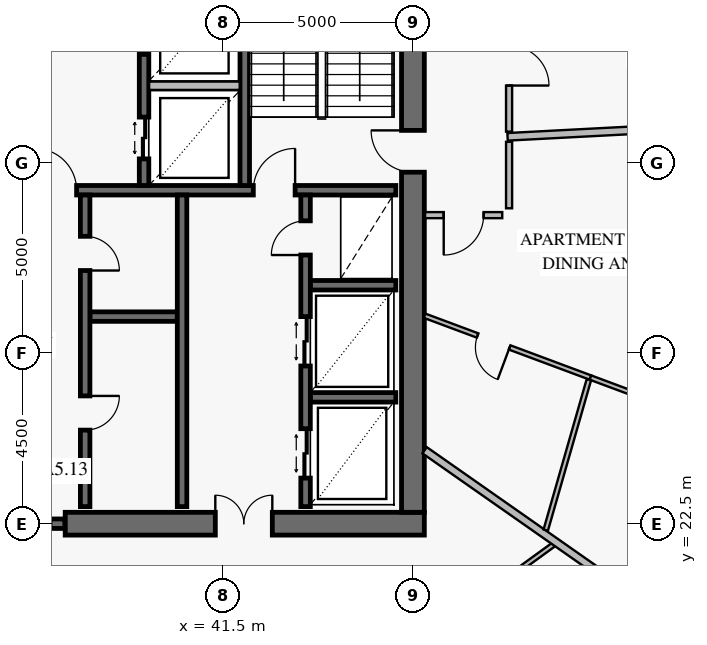
"""IFC4 building model, lengths in metres.
Left out: names, types, materials, properties, quantities, classifications, styles, units other than length and angle.
Written with IfcOpenShell. Run it as: python <this file> out.ifc"""

import sys

from ifc_helpers import new_model, si_unit, direction, frame, frame_2d, origin, place, context, subcontext, project, spatial, rectangle, extrude, element, fill, save


model = new_model("IFC4")
c1 = context("Model", 3, precision=1e-05, world=origin(), true_north=direction((0.0, 1.0)))
c2 = subcontext(c1, "Body", "Model", "MODEL_VIEW")
j1 = project(units=[si_unit("LENGTHUNIT", "METRE"), si_unit("PLANEANGLEUNIT", "RADIAN")], contexts=[c1])
p1 = place(None, origin())
s1 = spatial("IfcSite", under=j1, at=p1, CompositionType="ELEMENT")
p2 = place(p1, origin())
s2 = spatial("IfcBuilding", under=s1, at=p2, CompositionType="ELEMENT")
p3 = place(p2, frame((0.0, 0.0, 254.0)))
s3 = spatial("IfcBuildingStorey", under=s2, at=p3, CompositionType="ELEMENT", Elevation=254.0)
p4 = place(p3, frame((37.35, 22.5, 0.0), z_axis=(0.0, 0.0, 1.0), x_axis=(1.0, 0.0, 0.0)))
e1 = element("IfcWall", 1, at=p4, inside=s3, PredefinedType="SHEAR", context=c2, shape_type="SweptSolid", body=[
    extrude(rectangle(XDim=9.45, YDim=0.6, at=frame_2d((4.725, 0.0))), origin(), (0.0, 0.0, 1.0), 3.8),
])
p5 = place(p4, frame((3.95, 0.0, 0.0)))
e2 = element("IfcOpeningElement", 2, at=p5, cuts=e1, PredefinedType="OPENING", context=c2, shape_type="SweptSolid", body=[
    extrude(rectangle(XDim=1.5, YDim=2.15, at=frame_2d((0.75, 1.075))), frame((0.0, 0.312, 0.0), z_axis=(0.0, -1.0, 0.0), x_axis=(1.0, 0.0, 0.0)), (0.0, 0.0, 1.0), 0.624),
])
p6 = place(p3, frame((46.5, 22.8, 0.0), z_axis=(0.0, 0.0, 1.0), x_axis=(0.0, 1.0, 0.0)))
e3 = element("IfcWall", 3, at=p6, inside=s3, PredefinedType="SHEAR", context=c2, shape_type="SweptSolid", body=[
    extrude(rectangle(XDim=18.4, YDim=0.6, at=frame_2d((9.2, 0.0))), origin(), (0.0, 0.0, 1.0), 3.8),
])
p7 = place(p6, frame((8.95, 0.0, 0.0)))
e4 = element("IfcOpeningElement", 4, at=p7, cuts=e3, PredefinedType="OPENING", context=c2, shape_type="SweptSolid", body=[
    extrude(rectangle(XDim=1.1, YDim=2.15, at=frame_2d((0.55, 1.075))), frame((0.0, 0.312, 0.0), z_axis=(0.0, -1.0, 0.0), x_axis=(1.0, 0.0, 0.0)), (0.0, 0.0, 1.0), 0.624),
])
p8 = place(p3, frame((35.06, 22.5, 0.0), z_axis=(0.0, 0.0, 1.0), x_axis=(1.0, 0.0, 0.0)))
e5 = element("IfcWall", 5, at=p8, inside=s3, PredefinedType="SOLIDWALL", context=c2, shape_type="SweptSolid", body=[
    extrude(rectangle(XDim=2.28, YDim=0.25, at=frame_2d((1.14, 0.0))), origin(), (0.0, 0.0, 1.0), 3.8),
])
p9 = place(p8, frame((0.39, 0.0, 0.0)))
e6 = element("IfcOpeningElement", 6, at=p9, cuts=e5, PredefinedType="OPENING", context=c2, shape_type="SweptSolid", body=[
    extrude(rectangle(XDim=1.5, YDim=2.15, at=frame_2d((0.75, 1.075))), frame((0.0, 0.137, 0.0), z_axis=(0.0, -1.0, 0.0), x_axis=(1.0, 0.0, 0.0)), (0.0, 0.0, 1.0), 0.274),
])
p10 = place(p3, frame((25.95, 31.275, 0.0), z_axis=(0.0, 0.0, 1.0), x_axis=(1.0, 0.0, 0.0)))
e7 = element("IfcWall", 7, at=p10, inside=s3, PredefinedType="SOLIDWALL", context=c2, shape_type="SweptSolid", body=[
    extrude(rectangle(XDim=20.1, YDim=0.25, at=frame_2d((10.05, 0.0))), origin(), (0.0, 0.0, 1.0), 3.8),
])
p11 = place(p10, frame((2.6, 0.0, 0.0)))
e8 = element("IfcOpeningElement", 8, at=p11, cuts=e7, PredefinedType="OPENING", context=c2, shape_type="SweptSolid", body=[
    extrude(rectangle(XDim=1.1, YDim=2.15, at=frame_2d((0.55, 1.075))), frame((0.0, 0.137, 0.0), z_axis=(0.0, -1.0, 0.0), x_axis=(1.0, 0.0, 0.0)), (0.0, 0.0, 1.0), 0.274),
])
p12 = place(p10, frame((10.6, 0.0, 0.0)))
e9 = element("IfcOpeningElement", 9, at=p12, cuts=e7, PredefinedType="OPENING", context=c2, shape_type="SweptSolid", body=[
    extrude(rectangle(XDim=1.1, YDim=2.15, at=frame_2d((0.55, 1.075))), frame((0.0, 0.137, 0.0), z_axis=(0.0, -1.0, 0.0), x_axis=(1.0, 0.0, 0.0)), (0.0, 0.0, 1.0), 0.274),
])
p13 = place(p10, frame((16.35, 0.0, 0.0)))
e10 = element("IfcOpeningElement", 10, at=p13, cuts=e7, PredefinedType="OPENING", context=c2, shape_type="SweptSolid", body=[
    extrude(rectangle(XDim=1.1, YDim=2.15, at=frame_2d((0.55, 1.075))), frame((0.0, 0.137, 0.0), z_axis=(0.0, -1.0, 0.0), x_axis=(1.0, 0.0, 0.0)), (0.0, 0.0, 1.0), 0.274),
])
p14 = place(p3, frame((42.075, 31.4, 0.0), z_axis=(0.0, 0.0, 1.0), x_axis=(0.0, 1.0, 0.0)))
e11 = element("IfcWall", 11, at=p14, inside=s3, PredefinedType="SOLIDWALL", context=c2, shape_type="SweptSolid", body=[
    extrude(rectangle(XDim=9.7, YDim=0.25, at=frame_2d((4.85, 0.0))), origin(), (0.0, 0.0, 1.0), 3.8),
])
p15 = place(p3, frame((39.425, 31.4, 0.0), z_axis=(0.0, 0.0, 1.0), x_axis=(0.0, 1.0, 0.0)))
e12 = element("IfcWall", 12, at=p15, inside=s3, PredefinedType="SOLIDWALL", context=c2, shape_type="SweptSolid", body=[
    extrude(rectangle(XDim=9.65, YDim=0.25, at=frame_2d((4.825, 0.0))), origin(), (0.0, 0.0, 1.0), 3.8),
])
p16 = place(p15, frame((0.7, 0.0, 0.0)))
e13 = element("IfcOpeningElement", 13, at=p16, cuts=e12, PredefinedType="OPENING", context=c2, shape_type="SweptSolid", body=[
    extrude(rectangle(XDim=1.1, YDim=2.2, at=frame_2d((0.55, 1.1))), frame((0.0, 0.137, 0.0), z_axis=(0.0, -1.0, 0.0), x_axis=(1.0, 0.0, 0.0)), (0.0, 0.0, 1.0), 0.274),
])
p17 = place(p15, frame((3.45, 0.0, 0.0)))
e14 = element("IfcOpeningElement", 14, at=p17, cuts=e12, PredefinedType="OPENING", context=c2, shape_type="SweptSolid", body=[
    extrude(rectangle(XDim=1.1, YDim=2.2, at=frame_2d((0.55, 1.1))), frame((0.0, 0.137, 0.0), z_axis=(0.0, -1.0, 0.0), x_axis=(1.0, 0.0, 0.0)), (0.0, 0.0, 1.0), 0.274),
])
p18 = place(p15, frame((6.2, 0.0, 0.0)))
e15 = element("IfcOpeningElement", 15, at=p18, cuts=e12, PredefinedType="OPENING", context=c2, shape_type="SweptSolid", body=[
    extrude(rectangle(XDim=1.1, YDim=2.2, at=frame_2d((0.55, 1.1))), frame((0.0, 0.137, 0.0), z_axis=(0.0, -1.0, 0.0), x_axis=(1.0, 0.0, 0.0)), (0.0, 0.0, 1.0), 0.274),
])
p19 = place(p15, frame((8.47, 0.0, 0.0)))
e16 = element("IfcOpeningElement", 16, at=p19, cuts=e12, PredefinedType="OPENING", context=c2, shape_type="SweptSolid", body=[
    extrude(rectangle(XDim=0.9, YDim=2.1, at=frame_2d((0.45, 1.05))), frame((0.0, 0.137, 0.0), z_axis=(0.0, -1.0, 0.0), x_axis=(1.0, 0.0, 0.0)), (0.0, 0.0, 1.0), 0.274),
])
p20 = place(p3, frame((38.0, 27.95, 0.0), z_axis=(0.0, 0.0, 1.0), x_axis=(1.0, 0.0, 0.0)))
e17 = element("IfcWall", 17, at=p20, inside=s3, PredefinedType="SOLIDWALL", context=c2, shape_type="SweptSolid", body=[
    extrude(rectangle(XDim=2.3, YDim=0.25, at=frame_2d((1.15, 0.0))), origin(), (0.0, 0.0, 1.0), 3.8),
])
p21 = place(p3, frame((37.875, 22.95, 0.0), z_axis=(0.0, 0.0, 1.0), x_axis=(0.0, 1.0, 0.0)))
e18 = element("IfcWall", 18, at=p21, inside=s3, PredefinedType="SOLIDWALL", context=c2, shape_type="SweptSolid", body=[
    extrude(rectangle(XDim=8.2, YDim=0.25, at=frame_2d((4.1, 0.0))), origin(), (0.0, 0.0, 1.0), 3.8),
])
p22 = place(p21, frame((2.012, 0.0, 0.0)))
e19 = element("IfcOpeningElement", 19, at=p22, cuts=e18, PredefinedType="OPENING", context=c2, shape_type="SweptSolid", body=[
    extrude(rectangle(XDim=0.9, YDim=2.1, at=frame_2d((0.45, 1.05))), frame((0.0, 0.137, 0.0), z_axis=(0.0, -1.0, 0.0), x_axis=(1.0, 0.0, 0.0)), (0.0, 0.0, 1.0), 0.274),
])
p23 = place(p21, frame((6.212, 0.0, 0.0)))
e20 = element("IfcOpeningElement", 20, at=p23, cuts=e18, PredefinedType="OPENING", context=c2, shape_type="SweptSolid", body=[
    extrude(rectangle(XDim=0.9, YDim=2.1, at=frame_2d((0.45, 1.05))), frame((0.0, 0.137, 0.0), z_axis=(0.0, -1.0, 0.0), x_axis=(1.0, 0.0, 0.0)), (0.0, 0.0, 1.0), 0.274),
])
p24 = place(p3, frame((40.425, 22.95, 0.0), z_axis=(0.0, 0.0, 1.0), x_axis=(0.0, 1.0, 0.0)))
e21 = element("IfcWall", 21, at=p24, inside=s3, PredefinedType="SOLIDWALL", context=c2, shape_type="SweptSolid", body=[
    extrude(rectangle(XDim=8.2, YDim=0.25, at=frame_2d((4.1, 0.0))), origin(), (0.0, 0.0, 1.0), 3.8),
])
for number, where, z_axis, x_axis in (
    (22, (43.8, 25.825, 0.0), (0.0, 0.0, 1.0), (1.0, 0.0, 0.0)),
    (23, (43.8, 28.775, 0.0), (0.0, 0.0, 1.0), (1.0, 0.0, 0.0)),
):
    element("IfcWall", number, at=place(p3, frame(where, z_axis=z_axis, x_axis=x_axis)), inside=s3, PredefinedType="SOLIDWALL", context=c2, shape_type="SweptSolid", body=[
        extrude(rectangle(XDim=2.25, YDim=0.25, at=frame_2d((1.125, 0.0))), origin(), (0.0, 0.0, 1.0), 3.8),
    ])
p25 = place(p3, frame((43.675, 22.95, 0.0), z_axis=(0.0, 0.0, 1.0), x_axis=(0.0, 1.0, 0.0)))
e24 = element("IfcWall", 24, at=p25, inside=s3, PredefinedType="SOLIDWALL", context=c2, shape_type="SweptSolid", body=[
    extrude(rectangle(XDim=8.2, YDim=0.25, at=frame_2d((4.1, 0.0))), origin(), (0.0, 0.0, 1.0), 3.8),
])
p26 = place(p25, frame((0.75, 0.0, 0.0)))
e25 = element("IfcOpeningElement", 25, at=p26, cuts=e24, PredefinedType="OPENING", context=c2, shape_type="SweptSolid", body=[
    extrude(rectangle(XDim=1.3, YDim=2.3, at=frame_2d((0.65, 1.15))), frame((0.0, 0.137, 0.0), z_axis=(0.0, -1.0, 0.0), x_axis=(1.0, 0.0, 0.0)), (0.0, 0.0, 1.0), 0.274),
])
p27 = place(p25, frame((3.7, 0.0, 0.0)))
e26 = element("IfcOpeningElement", 26, at=p27, cuts=e24, PredefinedType="OPENING", context=c2, shape_type="SweptSolid", body=[
    extrude(rectangle(XDim=1.3, YDim=2.3, at=frame_2d((0.65, 1.15))), frame((0.0, 0.137, 0.0), z_axis=(0.0, -1.0, 0.0), x_axis=(1.0, 0.0, 0.0)), (0.0, 0.0, 1.0), 0.274),
])
p28 = place(p25, frame((6.62, 0.0, 0.0)))
e27 = element("IfcOpeningElement", 27, at=p28, cuts=e24, PredefinedType="OPENING", context=c2, shape_type="SweptSolid", body=[
    extrude(rectangle(XDim=0.9, YDim=2.1, at=frame_2d((0.45, 1.05))), frame((0.0, 0.137, 0.0), z_axis=(0.0, -1.0, 0.0), x_axis=(1.0, 0.0, 0.0)), (0.0, 0.0, 1.0), 0.274),
])
p29 = place(p3, frame((46.808, 27.972, 0.0), z_axis=(0.0, 0.0, 1.0), x_axis=(0.937036038674, -0.349232676344, 0.0)))
e28 = element("IfcWall", 28, at=p29, inside=s3, PredefinedType="PARTITIONING", context=c2, shape_type="SweptSolid", body=[
    extrude(rectangle(XDim=4.657, YDim=0.12, at=frame_2d((2.329, 0.0))), origin(), (0.0, 0.0, 1.0), 3.55),
])
p30 = place(p29, frame((1.487, 0.0, 0.0)))
e29 = element("IfcOpeningElement", 29, at=p30, cuts=e28, PredefinedType="OPENING", context=c2, shape_type="SweptSolid", body=[
    extrude(rectangle(XDim=0.9, YDim=2.1, at=frame_2d((0.45, 1.05))), frame((0.0, 0.072, 0.0), z_axis=(0.0, -1.0, 0.0), x_axis=(1.0, 0.0, 0.0)), (0.0, 0.0, 1.0), 0.144),
])
p31 = place(p3, frame((51.172, 26.345, 0.0), z_axis=(0.0, 0.0, 1.0), x_axis=(0.937041629646, -0.349217674682, 0.0)))
e30 = element("IfcWall", 30, at=p31, inside=s3, PredefinedType="PARTITIONING", context=c2, shape_type="SweptSolid", body=[
    extrude(rectangle(XDim=4.101, YDim=0.12, at=frame_2d((2.051, 0.0))), origin(), (0.0, 0.0, 1.0), 3.15),
])
p32 = place(p31, frame((2.359, 0.0, 0.0)))
e31 = element("IfcOpeningElement", 31, at=p32, cuts=e30, PredefinedType="OPENING", context=c2, shape_type="SweptSolid", body=[
    extrude(rectangle(XDim=0.95, YDim=2.1, at=frame_2d((0.475, 1.05))), frame((0.0, 0.072, 0.0), z_axis=(0.0, -1.0, 0.0), x_axis=(1.0, 0.0, 0.0)), (0.0, 0.0, 1.0), 0.144),
])
p33 = place(p3, frame((46.82, 30.62, 0.0), z_axis=(0.0, 0.0, 1.0), x_axis=(1.0, 0.0, 0.0)))
e32 = element("IfcWall", 32, at=p33, inside=s3, PredefinedType="PARTITIONING", context=c2, shape_type="SweptSolid", body=[
    extrude(rectangle(XDim=2.03, YDim=0.16, at=frame_2d((1.015, 0.0))), origin(), (0.0, 0.0, 1.0), 3.55),
])
p34 = place(p33, frame((0.49, 0.0, 0.0)))
e33 = element("IfcOpeningElement", 33, at=p34, cuts=e32, PredefinedType="OPENING", context=c2, shape_type="SweptSolid", body=[
    extrude(rectangle(XDim=1.05, YDim=2.15, at=frame_2d((0.525, 1.075))), frame((0.0, 0.092, 0.0), z_axis=(0.0, -1.0, 0.0), x_axis=(1.0, 0.0, 0.0)), (0.0, 0.0, 1.0), 0.184),
])
p35 = place(p3, frame((49.03, 32.817, 0.0), z_axis=(0.0, 0.0, 1.0), x_axis=(0.0, 1.0, 0.0)))
e34 = element("IfcWall", 34, at=p35, inside=s3, PredefinedType="PARTITIONING", context=c2, shape_type="SweptSolid", body=[
    extrude(rectangle(XDim=3.476, YDim=0.16, at=frame_2d((1.738, 0.0))), origin(), (0.0, 0.0, 1.0), 2.95),
])
p36 = place(p35, frame((1.213, 0.0, 0.0)))
e35 = element("IfcOpeningElement", 35, at=p36, cuts=e34, PredefinedType="OPENING", context=c2, shape_type="SweptSolid", body=[
    extrude(rectangle(XDim=1.05, YDim=2.15, at=frame_2d((0.525, 1.075))), frame((0.0, 0.092, 0.0), z_axis=(0.0, -1.0, 0.0), x_axis=(1.0, 0.0, 0.0)), (0.0, 0.0, 1.0), 0.184),
])
p37 = place(p3, frame((39.558, 34.025, 0.0), z_axis=(0.0, 0.0, 1.0), x_axis=(1.0, 0.0, 0.0)))
e36 = element("IfcWall", 36, at=p37, inside=s3, PredefinedType="PARTITIONING", context=c2, shape_type="SweptSolid", body=[
    extrude(rectangle(XDim=2.384, YDim=0.22, at=frame_2d((1.192, 0.0))), origin(), (0.0, 0.0, 1.0), 3.55),
])
p38 = place(p3, frame((48.91, 21.013, 0.0), z_axis=(0.0, 0.0, 1.0), x_axis=(0.809007643974, 0.5877981218, 0.0)))
e37 = element("IfcWall", 37, at=p38, inside=s3, PredefinedType="PARTITIONING", context=c2, shape_type="SweptSolid", body=[
    extrude(rectangle(XDim=1.632, YDim=0.12, at=frame_2d((0.816, 0.0))), origin(), (0.0, 0.0, 1.0), 3.55),
])
p39 = place(p3, frame((46.808, 24.432, 0.0), z_axis=(0.0, 0.0, 1.0), x_axis=(0.819149112162, -0.57358062384, 0.0)))
e38 = element("IfcWall", 38, at=p39, inside=s3, PredefinedType="PARTITIONING", context=c2, shape_type="SweptSolid", body=[
    extrude(rectangle(XDim=12.467, YDim=0.2, at=frame_2d((6.233, 0.0))), origin(), (0.0, 0.0, 1.0), 2.93),
])
p40 = place(p3, frame((49.995, 22.332, 0.0), z_axis=(0.0, 0.0, 1.0), x_axis=(0.27563759031, 0.961261628699, 0.0)))
e39 = element("IfcWall", 39, at=p40, inside=s3, PredefinedType="PARTITIONING", context=c2, shape_type="SweptSolid", body=[
    extrude(rectangle(XDim=4.116, YDim=0.12, at=frame_2d((2.058, 0.0))), origin(), (0.0, 0.0, 1.0), 3.55),
])
p41 = place(p3, frame((48.99, 32.681, 0.0), z_axis=(0.0, 0.0, 1.0), x_axis=(0.998629458789, 0.052337405734, 0.0)))
e40 = element("IfcWall", 40, at=p41, inside=s3, PredefinedType="PARTITIONING", context=c2, shape_type="SweptSolid", body=[
    extrude(rectangle(XDim=15.683, YDim=0.2, at=frame_2d((7.841, 0.0))), origin(), (0.0, 0.0, 1.0), 2.93),
])
p42 = place(p3, frame((49.03, 30.8, 0.0), z_axis=(0.0, 0.0, 1.0), x_axis=(0.0, 1.0, 0.0)))
e41 = element("IfcWall", 41, at=p42, inside=s3, PredefinedType="PARTITIONING", context=c2, shape_type="SweptSolid", body=[
    extrude(rectangle(XDim=1.749, YDim=0.16, at=frame_2d((0.875, 0.0))), origin(), (0.0, 0.0, 1.0), 3.55),
])
p43 = place(p7, origin())
e42 = element("IfcDoor", 42, at=p43, inside=s3, OperationType="SINGLE_SWING_RIGHT", PredefinedType="USERDEFINED", context=c2, shape_type="SweptSolid", body=[
    extrude(rectangle(XDim=1.1, YDim=2.15, at=frame_2d((0.55, 1.075))), frame((0.0, 0.025, 0.0), z_axis=(0.0, -1.0, 0.0), x_axis=(1.0, 0.0, 0.0)), (0.0, 0.0, 1.0), 0.05),
])
fill(e4, e42)
p44 = place(p5, origin())
e43 = element("IfcDoor", 43, at=p44, inside=s3, OperationType="DOUBLE_DOOR_SINGLE_SWING", PredefinedType="DOOR", context=c2, shape_type="SweptSolid", body=[
    extrude(rectangle(XDim=1.5, YDim=2.15, at=frame_2d((0.75, 1.075))), frame((0.0, 0.025, 0.0), z_axis=(0.0, -1.0, 0.0), x_axis=(1.0, 0.0, 0.0)), (0.0, 0.0, 1.0), 0.05),
])
fill(e2, e43)
p45 = place(p12, origin())
e44 = element("IfcDoor", 44, at=p45, inside=s3, OperationType="SINGLE_SWING_LEFT", PredefinedType="USERDEFINED", context=c2, shape_type="SweptSolid", body=[
    extrude(rectangle(XDim=1.1, YDim=2.15, at=frame_2d((0.55, 1.075))), frame((0.0, 0.025, 0.0), z_axis=(0.0, -1.0, 0.0), x_axis=(1.0, 0.0, 0.0)), (0.0, 0.0, 1.0), 0.05),
])
fill(e9, e44)
p46 = place(p13, origin())
e45 = element("IfcDoor", 45, at=p46, inside=s3, OperationType="SINGLE_SWING_RIGHT", PredefinedType="USERDEFINED", context=c2, shape_type="SweptSolid", body=[
    extrude(rectangle(XDim=1.1, YDim=2.15, at=frame_2d((0.55, 1.075))), frame((0.0, 0.025, 0.0), z_axis=(0.0, -1.0, 0.0), x_axis=(1.0, 0.0, 0.0)), (0.0, 0.0, 1.0), 0.05),
])
fill(e10, e45)
p47 = place(p16, origin())
e46 = element("IfcDoor", 46, at=p47, inside=s3, OperationType="DOUBLE_DOOR_SLIDING", PredefinedType="DOOR", context=c2, shape_type="SweptSolid", body=[
    extrude(rectangle(XDim=1.1, YDim=2.2, at=frame_2d((0.55, 1.1))), frame((0.0, 0.025, 0.0), z_axis=(0.0, -1.0, 0.0), x_axis=(1.0, 0.0, 0.0)), (0.0, 0.0, 1.0), 0.05),
])
fill(e13, e46)
p48 = place(p17, origin())
e47 = element("IfcDoor", 47, at=p48, inside=s3, OperationType="DOUBLE_DOOR_SLIDING", PredefinedType="DOOR", context=c2, shape_type="SweptSolid", body=[
    extrude(rectangle(XDim=1.1, YDim=2.2, at=frame_2d((0.55, 1.1))), frame((0.0, 0.025, 0.0), z_axis=(0.0, -1.0, 0.0), x_axis=(1.0, 0.0, 0.0)), (0.0, 0.0, 1.0), 0.05),
])
fill(e14, e47)
p49 = place(p22, frame((0.9, 0.0, 0.0), z_axis=(0.0, 0.0, 1.0), x_axis=(-1.0, 0.0, 0.0)))
e48 = element("IfcDoor", 48, at=p49, inside=s3, OperationType="SINGLE_SWING_LEFT", PredefinedType="DOOR", context=c2, shape_type="SweptSolid", body=[
    extrude(rectangle(XDim=0.9, YDim=2.1, at=frame_2d((0.45, 1.05))), frame((0.0, 0.025, 0.0), z_axis=(0.0, -1.0, 0.0), x_axis=(1.0, 0.0, 0.0)), (0.0, 0.0, 1.0), 0.05),
])
fill(e19, e48)
p50 = place(p23, frame((0.9, 0.0, 0.0), z_axis=(0.0, 0.0, 1.0), x_axis=(-1.0, 0.0, 0.0)))
e49 = element("IfcDoor", 49, at=p50, inside=s3, OperationType="SINGLE_SWING_RIGHT", PredefinedType="DOOR", context=c2, shape_type="SweptSolid", body=[
    extrude(rectangle(XDim=0.9, YDim=2.1, at=frame_2d((0.45, 1.05))), frame((0.0, 0.025, 0.0), z_axis=(0.0, -1.0, 0.0), x_axis=(1.0, 0.0, 0.0)), (0.0, 0.0, 1.0), 0.05),
])
fill(e20, e49)
p51 = place(p26, origin())
e50 = element("IfcDoor", 50, at=p51, inside=s3, OperationType="DOUBLE_DOOR_SLIDING", PredefinedType="DOOR", context=c2, shape_type="SweptSolid", body=[
    extrude(rectangle(XDim=1.3, YDim=2.3, at=frame_2d((0.65, 1.15))), frame((0.0, 0.025, 0.0), z_axis=(0.0, -1.0, 0.0), x_axis=(1.0, 0.0, 0.0)), (0.0, 0.0, 1.0), 0.05),
])
fill(e25, e50)
p52 = place(p27, origin())
e51 = element("IfcDoor", 51, at=p52, inside=s3, OperationType="DOUBLE_DOOR_SLIDING", PredefinedType="DOOR", context=c2, shape_type="SweptSolid", body=[
    extrude(rectangle(XDim=1.3, YDim=2.3, at=frame_2d((0.65, 1.15))), frame((0.0, 0.025, 0.0), z_axis=(0.0, -1.0, 0.0), x_axis=(1.0, 0.0, 0.0)), (0.0, 0.0, 1.0), 0.05),
])
fill(e26, e51)
p53 = place(p28, origin())
e52 = element("IfcDoor", 52, at=p53, inside=s3, OperationType="SINGLE_SWING_LEFT", PredefinedType="DOOR", context=c2, shape_type="SweptSolid", body=[
    extrude(rectangle(XDim=0.9, YDim=2.1, at=frame_2d((0.45, 1.05))), frame((0.0, 0.025, 0.0), z_axis=(0.0, -1.0, 0.0), x_axis=(1.0, 0.0, 0.0)), (0.0, 0.0, 1.0), 0.05),
])
fill(e27, e52)
p54 = place(p30, frame((0.9, 0.0, 0.0), z_axis=(0.0, 0.0, 1.0), x_axis=(-1.0, 0.0, 0.0)))
e53 = element("IfcDoor", 53, at=p54, inside=s3, OperationType="SINGLE_SWING_LEFT", PredefinedType="DOOR", context=c2, shape_type="SweptSolid", body=[
    extrude(rectangle(XDim=0.9, YDim=2.1, at=frame_2d((0.45, 1.05))), frame((0.0, 0.025, 0.0), z_axis=(0.0, -1.0, 0.0), x_axis=(1.0, 0.0, 0.0)), (0.0, 0.0, 1.0), 0.05),
])
fill(e29, e53)
p55 = place(p34, frame((1.05, 0.0, 0.0), z_axis=(0.0, 0.0, 1.0), x_axis=(-1.0, 0.0, 0.0)))
e54 = element("IfcDoor", 54, at=p55, inside=s3, OperationType="SINGLE_SWING_RIGHT", PredefinedType="DOOR", context=c2, shape_type="SweptSolid", body=[
    extrude(rectangle(XDim=1.05, YDim=2.15, at=frame_2d((0.525, 1.075))), frame((0.0, 0.025, 0.0), z_axis=(0.0, -1.0, 0.0), x_axis=(1.0, 0.0, 0.0)), (0.0, 0.0, 1.0), 0.05),
])
fill(e33, e54)
p56 = place(p36, frame((1.05, 0.0, 0.0), z_axis=(0.0, 0.0, 1.0), x_axis=(-1.0, 0.0, 0.0)))
e55 = element("IfcDoor", 55, at=p56, inside=s3, OperationType="SINGLE_SWING_RIGHT", PredefinedType="DOOR", context=c2, shape_type="SweptSolid", body=[
    extrude(rectangle(XDim=1.05, YDim=2.15, at=frame_2d((0.525, 1.075))), frame((0.0, 0.025, 0.0), z_axis=(0.0, -1.0, 0.0), x_axis=(1.0, 0.0, 0.0)), (0.0, 0.0, 1.0), 0.05),
])
fill(e35, e55)
save(model, sys.argv[1])
